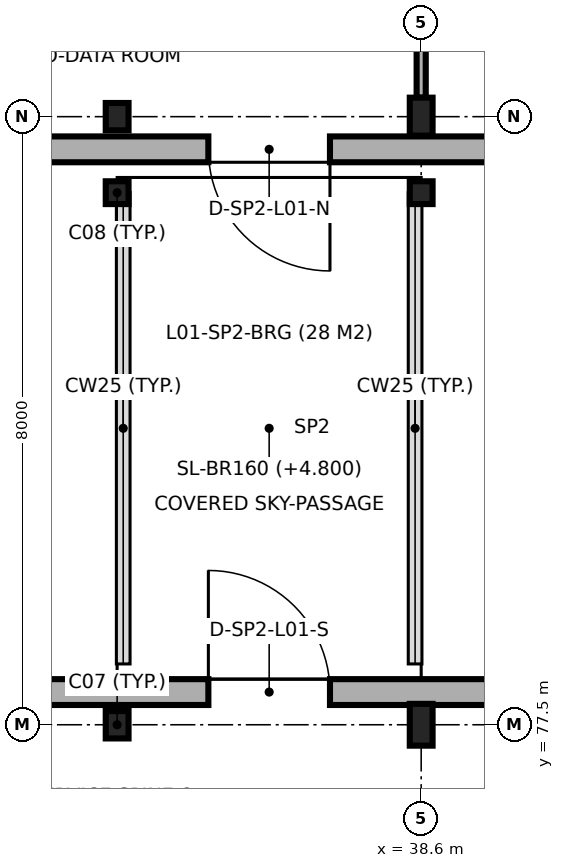
"""IFC4 building model, lengths in metres.
Left out: names, types, materials, properties, quantities, classifications, styles, units other than length and angle.
Written with IfcOpenShell. Run it as: python <this file> out.ifc"""

import sys

from ifc_helpers import new_model, si_unit, direction, frame, frame_2d, origin, origin_2d, place, context, subcontext, project, spatial, rectangle, i_section, extrude, element, fill, save


model = new_model("IFC4")
c1 = context("Model", 3, precision=1e-05, world=origin(), true_north=direction((0.0, 1.0)))
c2 = subcontext(c1, "Body", "Model", "MODEL_VIEW")
j1 = project(units=[si_unit("LENGTHUNIT", "METRE"), si_unit("PLANEANGLEUNIT", "RADIAN")], contexts=[c1])
p1 = place(None, origin())
s1 = spatial("IfcSite", under=j1, at=p1, CompositionType="ELEMENT")
p2 = place(p1, origin())
s2 = spatial("IfcBuilding", under=s1, at=p2, CompositionType="ELEMENT")
p3 = place(p2, frame((0.0, 0.0, 4.8)))
s3 = spatial("IfcBuildingStorey", under=s2, at=p3, CompositionType="ELEMENT", Elevation=4.8)
p4 = place(p3, frame((34.6, 77.5, 0.0), z_axis=(0.0, 0.0, 1.0), x_axis=(1.0, 0.0, 0.0)))
e1 = element("IfcColumn", 1, at=p4, inside=s3, PredefinedType="COLUMN", context=c2, shape_type="SweptSolid", body=[
    extrude(i_section(OverallWidth=0.3, OverallDepth=0.36, WebThickness=0.012, FlangeThickness=0.022, FilletRadius=0.027, at=origin_2d()), origin(), (0.0, 0.0, 1.0), 4.5),
])
p5 = place(p3, frame((34.6, 84.5, 0.0), z_axis=(0.0, 0.0, 1.0), x_axis=(1.0, 0.0, 0.0)))
e2 = element("IfcColumn", 2, at=p5, inside=s3, PredefinedType="COLUMN", context=c2, shape_type="SweptSolid", body=[
    extrude(i_section(OverallWidth=0.3, OverallDepth=0.3, WebThickness=0.011, FlangeThickness=0.019, FilletRadius=0.027, at=origin_2d()), origin(), (0.0, 0.0, 1.0), 4.5),
])
p6 = place(p3, frame((34.6, 85.5, 0.0), z_axis=(0.0, 0.0, 1.0), x_axis=(1.0, 0.0, 0.0)))
e3 = element("IfcColumn", 3, at=p6, inside=s3, PredefinedType="COLUMN", context=c2, shape_type="SweptSolid", body=[
    extrude(i_section(OverallWidth=0.3, OverallDepth=0.36, WebThickness=0.012, FlangeThickness=0.022, FilletRadius=0.027, at=origin_2d()), origin(), (0.0, 0.0, 1.0), 4.5),
])
p7 = place(p3, frame((38.6, 77.5, 0.0), z_axis=(0.0, 0.0, 1.0), x_axis=(1.0, 0.0, 0.0)))
e4 = element("IfcColumn", 4, at=p7, inside=s3, PredefinedType="COLUMN", context=c2, shape_type="SweptSolid", body=[
    extrude(i_section(OverallWidth=0.3, OverallDepth=0.55, WebThickness=0.015, FlangeThickness=0.029, FilletRadius=0.027, at=origin_2d()), origin(), (0.0, 0.0, 1.0), 4.5),
])
p8 = place(p3, frame((38.6, 84.5, 0.0), z_axis=(0.0, 0.0, 1.0), x_axis=(1.0, 0.0, 0.0)))
e5 = element("IfcColumn", 5, at=p8, inside=s3, PredefinedType="COLUMN", context=c2, shape_type="SweptSolid", body=[
    extrude(i_section(OverallWidth=0.3, OverallDepth=0.3, WebThickness=0.011, FlangeThickness=0.019, FilletRadius=0.027, at=origin_2d()), origin(), (0.0, 0.0, 1.0), 4.5),
])
p9 = place(p3, frame((38.6, 85.5, 0.0), z_axis=(0.0, 0.0, 1.0), x_axis=(1.0, 0.0, 0.0)))
e6 = element("IfcColumn", 6, at=p9, inside=s3, PredefinedType="COLUMN", context=c2, shape_type="SweptSolid", body=[
    extrude(i_section(OverallWidth=0.3, OverallDepth=0.5, WebThickness=0.014, FlangeThickness=0.028, FilletRadius=0.027, at=origin_2d()), origin(), (0.0, 0.0, 1.0), 4.5),
])
p10 = place(p3, frame((43.677, 77.93, 0.0), z_axis=(0.0, 0.0, 1.0), x_axis=(-1.0, 0.0, 0.0)))
e7 = element("IfcWall", 7, at=p10, inside=s3, PredefinedType="SOLIDWALL", context=c2, shape_type="SweptSolid", body=[
    extrude(rectangle(XDim=38.077, YDim=0.34, at=frame_2d((19.039, 0.0))), origin(), (0.0, 0.0, 1.0), 4.25),
])
p11 = place(p10, frame((6.277, 0.0, 0.0)))
e8 = element("IfcOpeningElement", 8, at=p11, cuts=e7, PredefinedType="OPENING", context=c2, shape_type="SweptSolid", body=[
    extrude(rectangle(XDim=1.6, YDim=2.2, at=frame_2d((0.8, 1.1))), frame((0.0, 0.18, 0.0), z_axis=(0.0, -1.0, 0.0), x_axis=(1.0, 0.0, 0.0)), (0.0, 0.0, 1.0), 0.36),
])
p12 = place(p10, frame((1.389, 0.0, 0.9)))
e9 = element("IfcOpeningElement", 9, at=p12, cuts=e7, PredefinedType="OPENING", context=c2, shape_type="SweptSolid", body=[
    extrude(rectangle(XDim=2.4, YDim=1.8, at=frame_2d((1.2, 0.9))), frame((0.0, 0.18, 0.0), z_axis=(0.0, -1.0, 0.0), x_axis=(1.0, 0.0, 0.0)), (0.0, 0.0, 1.0), 0.36),
])
p13 = place(p10, frame((10.357, 0.0, 0.9)))
e10 = element("IfcOpeningElement", 10, at=p13, cuts=e7, PredefinedType="OPENING", context=c2, shape_type="SweptSolid", body=[
    extrude(rectangle(XDim=1.8, YDim=2.1, at=frame_2d((0.9, 1.05))), frame((0.0, 0.18, 0.0), z_axis=(0.0, -1.0, 0.0), x_axis=(1.0, 0.0, 0.0)), (0.0, 0.0, 1.0), 0.36),
])
p14 = place(p10, frame((16.327, 0.0, 0.9)))
e11 = element("IfcOpeningElement", 11, at=p14, cuts=e7, PredefinedType="OPENING", context=c2, shape_type="SweptSolid", body=[
    extrude(rectangle(XDim=1.5, YDim=2.1, at=frame_2d((0.75, 1.05))), frame((0.0, 0.18, 0.0), z_axis=(0.0, -1.0, 0.0), x_axis=(1.0, 0.0, 0.0)), (0.0, 0.0, 1.0), 0.36),
])
p15 = place(p10, frame((24.027, 0.0, 0.9)))
e12 = element("IfcOpeningElement", 12, at=p15, cuts=e7, PredefinedType="OPENING", context=c2, shape_type="SweptSolid", body=[
    extrude(rectangle(XDim=2.1, YDim=2.1, at=frame_2d((1.05, 1.05))), frame((0.0, 0.18, 0.0), z_axis=(0.0, -1.0, 0.0), x_axis=(1.0, 0.0, 0.0)), (0.0, 0.0, 1.0), 0.36),
])
p16 = place(p10, frame((31.727, 0.0, 0.9)))
e13 = element("IfcOpeningElement", 13, at=p16, cuts=e7, PredefinedType="OPENING", context=c2, shape_type="SweptSolid", body=[
    extrude(rectangle(XDim=2.7, YDim=2.1, at=frame_2d((1.35, 1.05))), frame((0.0, 0.18, 0.0), z_axis=(0.0, -1.0, 0.0), x_axis=(1.0, 0.0, 0.0)), (0.0, 0.0, 1.0), 0.36),
])
p17 = place(p3, frame((5.922, 85.07, 0.0), z_axis=(0.0, 0.0, 1.0), x_axis=(1.0, 0.0, 0.0)))
e14 = element("IfcWall", 14, at=p17, inside=s3, PredefinedType="SOLIDWALL", context=c2, shape_type="SweptSolid", body=[
    extrude(rectangle(XDim=37.878, YDim=0.34, at=frame_2d((18.939, 0.0))), origin(), (0.0, 0.0, 1.0), 4.25),
])
p18 = place(p17, frame((29.878, 0.0, 0.0)))
e15 = element("IfcOpeningElement", 15, at=p18, cuts=e14, PredefinedType="OPENING", context=c2, shape_type="SweptSolid", body=[
    extrude(rectangle(XDim=1.6, YDim=2.2, at=frame_2d((0.8, 1.1))), frame((0.0, 0.18, 0.0), z_axis=(0.0, -1.0, 0.0), x_axis=(1.0, 0.0, 0.0)), (0.0, 0.0, 1.0), 0.36),
])
p19 = place(p17, frame((3.178, 0.0, 0.9)))
e16 = element("IfcOpeningElement", 16, at=p19, cuts=e14, PredefinedType="OPENING", context=c2, shape_type="SweptSolid", body=[
    extrude(rectangle(XDim=3.0, YDim=1.8, at=frame_2d((1.5, 0.9))), frame((0.0, 0.18, 0.0), z_axis=(0.0, -1.0, 0.0), x_axis=(1.0, 0.0, 0.0)), (0.0, 0.0, 1.0), 0.36),
])
p20 = place(p17, frame((12.088, 0.0, 0.9)))
e17 = element("IfcOpeningElement", 17, at=p20, cuts=e14, PredefinedType="OPENING", context=c2, shape_type="SweptSolid", body=[
    extrude(rectangle(XDim=1.5, YDim=2.1, at=frame_2d((0.75, 1.05))), frame((0.0, 0.18, 0.0), z_axis=(0.0, -1.0, 0.0), x_axis=(1.0, 0.0, 0.0)), (0.0, 0.0, 1.0), 0.36),
])
p21 = place(p17, frame((17.398, 0.0, 0.9)))
e18 = element("IfcOpeningElement", 18, at=p21, cuts=e14, PredefinedType="OPENING", context=c2, shape_type="SweptSolid", body=[
    extrude(rectangle(XDim=1.8, YDim=2.1, at=frame_2d((0.9, 1.05))), frame((0.0, 0.18, 0.0), z_axis=(0.0, -1.0, 0.0), x_axis=(1.0, 0.0, 0.0)), (0.0, 0.0, 1.0), 0.36),
])
p22 = place(p17, frame((20.708, 0.0, 0.9)))
e19 = element("IfcOpeningElement", 19, at=p22, cuts=e14, PredefinedType="OPENING", context=c2, shape_type="SweptSolid", body=[
    extrude(rectangle(XDim=2.7, YDim=2.1, at=frame_2d((1.35, 1.05))), frame((0.0, 0.18, 0.0), z_axis=(0.0, -1.0, 0.0), x_axis=(1.0, 0.0, 0.0)), (0.0, 0.0, 1.0), 0.36),
])
p23 = place(p17, frame((25.958, 0.0, 0.9)))
e20 = element("IfcOpeningElement", 20, at=p23, cuts=e14, PredefinedType="OPENING", context=c2, shape_type="SweptSolid", body=[
    extrude(rectangle(XDim=1.2, YDim=1.5, at=frame_2d((0.6, 0.75))), frame((0.0, 0.18, 0.0), z_axis=(0.0, -1.0, 0.0), x_axis=(1.0, 0.0, 0.0)), (0.0, 0.0, 1.0), 0.36),
])
p24 = place(p17, frame((34.328, 0.0, 0.9)))
e21 = element("IfcOpeningElement", 21, at=p24, cuts=e14, PredefinedType="OPENING", context=c2, shape_type="SweptSolid", body=[
    extrude(rectangle(XDim=1.8, YDim=1.5, at=frame_2d((0.9, 0.75))), frame((0.0, 0.18, 0.0), z_axis=(0.0, -1.0, 0.0), x_axis=(1.0, 0.0, 0.0)), (0.0, 0.0, 1.0), 0.36),
])
p25 = place(p3, frame((38.6, 85.75, 0.0), z_axis=(0.0, 0.0, 1.0), x_axis=(0.0, 1.0, 0.0)))
e22 = element("IfcWall", 22, at=p25, inside=s3, PredefinedType="PARTITIONING", context=c2, shape_type="SweptSolid", body=[
    extrude(rectangle(XDim=7.5, YDim=0.12, at=frame_2d((3.75, 0.0))), origin(), (0.0, 0.0, 1.0), 3.85),
])
p26 = place(p25, frame((5.33, 0.0, 0.0)))
e23 = element("IfcOpeningElement", 23, at=p26, cuts=e22, PredefinedType="OPENING", context=c2, shape_type="SweptSolid", body=[
    extrude(rectangle(XDim=1.0, YDim=2.15, at=frame_2d((0.5, 1.075))), frame((0.0, 0.07, 0.0), z_axis=(0.0, -1.0, 0.0), x_axis=(1.0, 0.0, 0.0)), (0.0, 0.0, 1.0), 0.14),
])
p27 = place(p11, frame((1.6, 0.0, 0.0), z_axis=(0.0, 0.0, 1.0), x_axis=(-1.0, 0.0, 0.0)))
e24 = element("IfcDoor", 24, at=p27, inside=s3, OperationType="SINGLE_SWING_RIGHT", PredefinedType="DOOR", context=c2, shape_type="SweptSolid", body=[
    extrude(rectangle(XDim=1.6, YDim=2.2, at=frame_2d((0.8, 1.1))), frame((0.0, 0.025, 0.0), z_axis=(0.0, -1.0, 0.0), x_axis=(1.0, 0.0, 0.0)), (0.0, 0.0, 1.0), 0.05),
])
fill(e8, e24)
p28 = place(p18, frame((1.6, 0.0, 0.0), z_axis=(0.0, 0.0, 1.0), x_axis=(-1.0, 0.0, 0.0)))
e25 = element("IfcDoor", 25, at=p28, inside=s3, OperationType="SINGLE_SWING_RIGHT", PredefinedType="DOOR", context=c2, shape_type="SweptSolid", body=[
    extrude(rectangle(XDim=1.6, YDim=2.2, at=frame_2d((0.8, 1.1))), frame((0.0, 0.025, 0.0), z_axis=(0.0, -1.0, 0.0), x_axis=(1.0, 0.0, 0.0)), (0.0, 0.0, 1.0), 0.05),
])
fill(e15, e25)
save(model, sys.argv[1])
